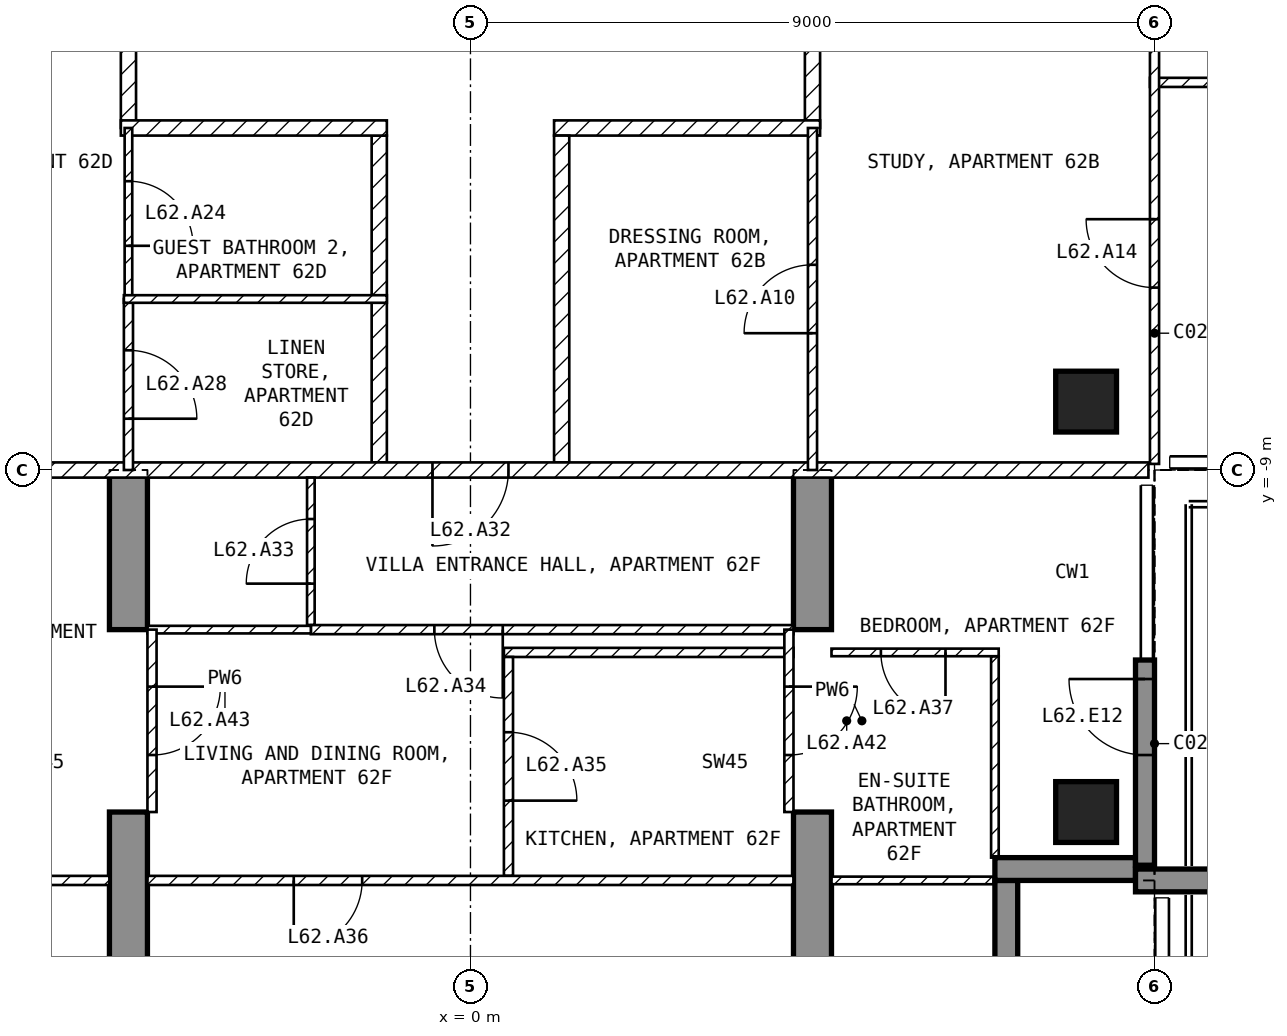
"""IFC4 building model, lengths in metres.
Left out: names, types, materials, properties, quantities, classifications, styles, units other than length and angle.
Written with IfcOpenShell. Run it as: python <this file> out.ifc"""

import sys

from ifc_helpers import new_model, si_unit, direction, frame, frame_2d, origin, origin_2d, place, context, subcontext, project, spatial, polyline, rectangle, outline, extrude, element, fill, save


model = new_model("IFC4")
c1 = context("Model", 3, precision=1e-05, world=origin(), true_north=direction((0.0, 1.0)))
c2 = subcontext(c1, "Body", "Model", "MODEL_VIEW")
j1 = project(units=[si_unit("LENGTHUNIT", "METRE"), si_unit("PLANEANGLEUNIT", "RADIAN")], contexts=[c1])
p1 = place(None, origin())
s1 = spatial("IfcSite", under=j1, at=p1, CompositionType="ELEMENT")
p2 = place(p1, origin())
s2 = spatial("IfcBuilding", under=s1, at=p2, CompositionType="ELEMENT")
p3 = place(p2, frame((0.0, 0.0, 246.5)))
s3 = spatial("IfcBuildingStorey", under=s2, at=p3, CompositionType="ELEMENT", Elevation=246.5)
for number, where, z_axis, x_axis in (
    (1, (8.1, -13.5, -0.25), (0.0, 0.0, 1.0), (1.0, 0.0, 0.0)),
    (2, (8.1, -8.1, -0.25), (0.0, 0.0, 1.0), (1.0, 0.0, 0.0)),
):
    element("IfcColumn", number, at=place(p3, frame(where, z_axis=z_axis, x_axis=x_axis)), inside=s3, PredefinedType="COLUMN", context=c2, shape_type="SweptSolid", body=[
        extrude(rectangle(XDim=0.8, YDim=0.8, at=origin_2d()), origin(), (0.0, 0.0, 1.0), 3.5),
    ])
for number, where, z_axis, x_axis in (
    (3, (-4.75, -16.7, -0.25), (1.0, 0.0, 0.0), (0.0, 1.0, 0.0)),
    (4, (4.25, -16.7, -0.25), (1.0, 0.0, 0.0), (0.0, 1.0, 0.0)),
):
    element("IfcWall", number, at=place(p3, frame(where, z_axis=z_axis, x_axis=x_axis)), inside=s3, PredefinedType="SHEAR", context=c2, shape_type="SweptSolid", body=[
        extrude(outline(polyline([(0.0, 0.0), (3.2, 0.0), (3.2, 2.65), (5.6, 2.65), (5.6, 0.0), (7.7, 0.0), (7.7, 3.5), (0.0, 3.5), (0.0, 0.0)])), origin(), (0.0, 0.0, 1.0), 0.5),
    ])
p4 = place(p3, frame((8.875, -14.2, 0.0), z_axis=(0.0, 0.0, 1.0), x_axis=(0.0, 1.0, 0.0)))
e5 = element("IfcWall", 5, at=p4, inside=s3, PredefinedType="SOLIDWALL", context=c2, shape_type="SweptSolid", body=[
    extrude(rectangle(XDim=2.7, YDim=0.25, at=frame_2d((1.35, 0.0))), origin(), (0.0, 0.0, 1.0), 3.25),
])
p5 = place(p4, frame((1.45, 0.0, 0.0)))
e6 = element("IfcOpeningElement", 6, at=p5, cuts=e5, PredefinedType="OPENING", context=c2, shape_type="SweptSolid", body=[
    extrude(rectangle(XDim=1.0, YDim=2.4, at=frame_2d((0.5, 1.2))), frame((0.0, 0.135, 0.0), z_axis=(0.0, -1.0, 0.0), x_axis=(1.0, 0.0, 0.0)), (0.0, 0.0, 1.0), 0.27),
])
p6 = place(p3, frame((7.05, -16.2, 0.0), z_axis=(0.0, 0.0, 1.0), x_axis=(0.0, 1.0, 0.0)))
e7 = element("IfcWall", 7, at=p6, inside=s3, PredefinedType="SOLIDWALL", context=c2, shape_type="SweptSolid", body=[
    extrude(rectangle(XDim=1.8, YDim=0.3, at=frame_2d((0.9, 0.0))), origin(), (0.0, 0.0, 1.0), 3.25),
])
p7 = place(p3, frame((6.9, -14.25, 0.0), z_axis=(0.0, 0.0, 1.0), x_axis=(1.0, 0.0, 0.0)))
e8 = element("IfcWall", 8, at=p7, inside=s3, PredefinedType="SOLIDWALL", context=c2, shape_type="SweptSolid", body=[
    extrude(rectangle(XDim=1.85, YDim=0.3, at=frame_2d((0.925, 0.0))), origin(), (0.0, 0.0, 1.0), 3.25),
])
p8 = place(p3, frame((8.75, -14.4, 0.0), z_axis=(0.0, 0.0, 1.0), x_axis=(1.0, 0.0, 0.0)))
e9 = element("IfcWall", 9, at=p8, inside=s3, PredefinedType="SOLIDWALL", context=c2, shape_type="SweptSolid", body=[
    extrude(rectangle(XDim=2.95, YDim=0.3, at=frame_2d((1.475, 0.0))), origin(), (0.0, 0.0, 1.0), 3.25),
])
p9 = place(p3, frame((4.5, -1.3, 0.0), z_axis=(0.0, 0.0, 1.0), x_axis=(0.0, -1.0, 0.0)))
e10 = element("IfcWall", 10, at=p9, inside=s3, PredefinedType="PARTITIONING", context=c2, shape_type="SweptSolid", body=[
    extrude(rectangle(XDim=3.2, YDim=0.2, at=frame_2d((1.6, 0.0))), origin(), (0.0, 0.0, 1.0), 3.25),
])
p10 = place(p3, frame((4.6, -4.5, 0.0), z_axis=(0.0, 0.0, 1.0), x_axis=(-1.0, 0.0, 0.0)))
e11 = element("IfcWall", 11, at=p10, inside=s3, PredefinedType="PARTITIONING", context=c2, shape_type="SweptSolid", body=[
    extrude(rectangle(XDim=3.5, YDim=0.2, at=frame_2d((1.75, 0.0))), origin(), (0.0, 0.0, 1.0), 3.25),
])
p11 = place(p3, frame((1.2, -4.6, 0.0), z_axis=(0.0, 0.0, 1.0), x_axis=(0.0, -1.0, 0.0)))
e12 = element("IfcWall", 12, at=p11, inside=s3, PredefinedType="PARTITIONING", context=c2, shape_type="SweptSolid", body=[
    extrude(rectangle(XDim=4.3, YDim=0.2, at=frame_2d((2.15, 0.0))), origin(), (0.0, 0.0, 1.0), 3.25),
])
p12 = place(p3, frame((-4.5, -4.5, 0.0), z_axis=(0.0, 0.0, 1.0), x_axis=(0.0, 1.0, 0.0)))
e13 = element("IfcWall", 13, at=p12, inside=s3, PredefinedType="PARTITIONING", context=c2, shape_type="SweptSolid", body=[
    extrude(rectangle(XDim=3.2, YDim=0.2, at=frame_2d((1.6, 0.0))), origin(), (0.0, 0.0, 1.0), 3.25),
])
p13 = place(p3, frame((-1.2, -8.9, 0.0), z_axis=(0.0, 0.0, 1.0), x_axis=(0.0, 1.0, 0.0)))
e14 = element("IfcWall", 14, at=p13, inside=s3, PredefinedType="PARTITIONING", context=c2, shape_type="SweptSolid", body=[
    extrude(rectangle(XDim=4.3, YDim=0.2, at=frame_2d((2.15, 0.0))), origin(), (0.0, 0.0, 1.0), 3.25),
])
p14 = place(p3, frame((-1.1, -4.5, 0.0), z_axis=(0.0, 0.0, 1.0), x_axis=(-1.0, 0.0, 0.0)))
e15 = element("IfcWall", 15, at=p14, inside=s3, PredefinedType="PARTITIONING", context=c2, shape_type="SweptSolid", body=[
    extrude(rectangle(XDim=3.5, YDim=0.2, at=frame_2d((1.75, 0.0))), origin(), (0.0, 0.0, 1.0), 3.25),
])
p15 = place(p3, frame((8.92, -9.0, 0.0), z_axis=(0.0, 0.0, 1.0), x_axis=(-1.0, 0.0, 0.0)))
e16 = element("IfcWall", 16, at=p15, inside=s3, PredefinedType="PARTITIONING", context=c2, shape_type="SweptSolid", body=[
    extrude(rectangle(XDim=17.84, YDim=0.2, at=frame_2d((8.92, 0.0))), origin(), (0.0, 0.0, 1.0), 3.25),
])
p16 = place(p15, frame((8.42, 0.0, 0.0)))
e17 = element("IfcOpeningElement", 17, at=p16, cuts=e16, PredefinedType="OPENING", context=c2, shape_type="SweptSolid", body=[
    extrude(rectangle(XDim=1.0, YDim=2.1, at=frame_2d((0.5, 1.05))), frame((0.0, 0.11, 0.0), z_axis=(0.0, -1.0, 0.0), x_axis=(1.0, 0.0, 0.0)), (0.0, 0.0, 1.0), 0.22),
])
p17 = place(p3, frame((16.8, -3.9, 0.0), z_axis=(0.0, 0.0, 1.0), x_axis=(-1.0, 0.0, 0.0)))
e18 = element("IfcWall", 18, at=p17, inside=s3, PredefinedType="PARTITIONING", context=c2, shape_type="SweptSolid", body=[
    extrude(rectangle(XDim=7.86, YDim=0.12, at=frame_2d((3.93, 0.0))), origin(), (0.0, 0.0, 1.0), 3.25),
])
p18 = place(p17, frame((3.15, 0.0, 0.0)))
e19 = element("IfcOpeningElement", 19, at=p18, cuts=e18, PredefinedType="OPENING", context=c2, shape_type="SweptSolid", body=[
    extrude(rectangle(XDim=0.9, YDim=2.1, at=frame_2d((0.45, 1.05))), frame((0.0, 0.07, 0.0), z_axis=(0.0, -1.0, 0.0), x_axis=(1.0, 0.0, 0.0)), (0.0, 0.0, 1.0), 0.14),
])
p19 = place(p3, frame((9.0, -8.92, 0.0), z_axis=(0.0, 0.0, 1.0), x_axis=(0.0, 1.0, 0.0)))
e20 = element("IfcWall", 20, at=p19, inside=s3, PredefinedType="PARTITIONING", context=c2, shape_type="SweptSolid", body=[
    extrude(rectangle(XDim=7.62, YDim=0.12, at=frame_2d((3.81, 0.0))), origin(), (0.0, 0.0, 1.0), 3.25),
])
p20 = place(p19, frame((2.32, 0.0, 0.0)))
e21 = element("IfcOpeningElement", 21, at=p20, cuts=e20, PredefinedType="OPENING", context=c2, shape_type="SweptSolid", body=[
    extrude(rectangle(XDim=0.9, YDim=2.1, at=frame_2d((0.45, 1.05))), frame((0.0, 0.07, 0.0), z_axis=(0.0, -1.0, 0.0), x_axis=(1.0, 0.0, 0.0)), (0.0, 0.0, 1.0), 0.14),
])
p21 = place(p3, frame((4.5, -9.0, 0.0), z_axis=(0.0, 0.0, 1.0), x_axis=(0.0, 1.0, 0.0)))
e22 = element("IfcWall", 22, at=p21, inside=s3, PredefinedType="PARTITIONING", context=c2, shape_type="SweptSolid", body=[
    extrude(rectangle(XDim=4.5, YDim=0.12, at=frame_2d((2.25, 0.0))), origin(), (0.0, 0.0, 1.0), 3.25),
])
p22 = place(p21, frame((1.8, 0.0, 0.0)))
e23 = element("IfcOpeningElement", 23, at=p22, cuts=e22, PredefinedType="OPENING", context=c2, shape_type="SweptSolid", body=[
    extrude(rectangle(XDim=0.9, YDim=2.1, at=frame_2d((0.45, 1.05))), frame((0.0, 0.07, 0.0), z_axis=(0.0, -1.0, 0.0), x_axis=(1.0, 0.0, 0.0)), (0.0, 0.0, 1.0), 0.14),
])
p23 = place(p3, frame((-4.5, -4.5, 0.0), z_axis=(0.0, 0.0, 1.0), x_axis=(0.0, -1.0, 0.0)))
e24 = element("IfcWall", 24, at=p23, inside=s3, PredefinedType="PARTITIONING", context=c2, shape_type="SweptSolid", body=[
    extrude(rectangle(XDim=2.25, YDim=0.1, at=frame_2d((1.125, 0.0))), origin(), (0.0, 0.0, 1.0), 3.25),
])
p24 = place(p23, frame((0.7, 0.0, 0.0)))
e25 = element("IfcOpeningElement", 25, at=p24, cuts=e24, PredefinedType="OPENING", context=c2, shape_type="SweptSolid", body=[
    extrude(rectangle(XDim=0.85, YDim=2.1, at=frame_2d((0.425, 1.05))), frame((0.0, 0.06, 0.0), z_axis=(0.0, -1.0, 0.0), x_axis=(1.0, 0.0, 0.0)), (0.0, 0.0, 1.0), 0.12),
])
p25 = place(p3, frame((-4.5, -6.75, 0.0), z_axis=(0.0, 0.0, 1.0), x_axis=(0.0, -1.0, 0.0)))
e26 = element("IfcWall", 26, at=p25, inside=s3, PredefinedType="PARTITIONING", context=c2, shape_type="SweptSolid", body=[
    extrude(rectangle(XDim=2.25, YDim=0.12, at=frame_2d((1.125, 0.0))), origin(), (0.0, 0.0, 1.0), 3.25),
])
p26 = place(p25, frame((0.675, 0.0, 0.0)))
e27 = element("IfcOpeningElement", 27, at=p26, cuts=e26, PredefinedType="OPENING", context=c2, shape_type="SweptSolid", body=[
    extrude(rectangle(XDim=0.9, YDim=2.1, at=frame_2d((0.45, 1.05))), frame((0.0, 0.07, 0.0), z_axis=(0.0, -1.0, 0.0), x_axis=(1.0, 0.0, 0.0)), (0.0, 0.0, 1.0), 0.14),
])
p27 = place(p3, frame((-1.1, -6.75, 0.0), z_axis=(0.0, 0.0, 1.0), x_axis=(-1.0, 0.0, 0.0)))
e28 = element("IfcWall", 28, at=p27, inside=s3, PredefinedType="PARTITIONING", context=c2, shape_type="SweptSolid", body=[
    extrude(rectangle(XDim=3.46, YDim=0.1, at=frame_2d((1.73, 0.0))), origin(), (0.0, 0.0, 1.0), 3.25),
])
p28 = place(p3, frame((-2.1, -11.04, 0.0), z_axis=(0.0, 0.0, 1.0), x_axis=(0.0, 1.0, 0.0)))
e29 = element("IfcWall", 29, at=p28, inside=s3, PredefinedType="PARTITIONING", context=c2, shape_type="SweptSolid", body=[
    extrude(rectangle(XDim=1.94, YDim=0.1, at=frame_2d((0.97, 0.0))), origin(), (0.0, 0.0, 1.0), 3.25),
])
p29 = place(p28, frame((0.545, 0.0, 0.0)))
e30 = element("IfcOpeningElement", 30, at=p29, cuts=e29, PredefinedType="OPENING", context=c2, shape_type="SweptSolid", body=[
    extrude(rectangle(XDim=0.85, YDim=2.1, at=frame_2d((0.425, 1.05))), frame((0.0, 0.06, 0.0), z_axis=(0.0, -1.0, 0.0), x_axis=(1.0, 0.0, 0.0)), (0.0, 0.0, 1.0), 0.12),
])
p30 = place(p3, frame((4.25, -11.1, 0.0), z_axis=(0.0, 0.0, 1.0), x_axis=(-1.0, 0.0, 0.0)))
e31 = element("IfcWall", 31, at=p30, inside=s3, PredefinedType="PARTITIONING", context=c2, shape_type="SweptSolid", body=[
    extrude(rectangle(XDim=6.35, YDim=0.12, at=frame_2d((3.175, 0.0))), origin(), (0.0, 0.0, 1.0), 3.25),
])
p31 = place(p30, frame((3.825, 0.0, 0.0)))
e32 = element("IfcOpeningElement", 32, at=p31, cuts=e31, PredefinedType="OPENING", context=c2, shape_type="SweptSolid", body=[
    extrude(rectangle(XDim=0.9, YDim=2.1, at=frame_2d((0.45, 1.05))), frame((0.0, 0.07, 0.0), z_axis=(0.0, -1.0, 0.0), x_axis=(1.0, 0.0, 0.0)), (0.0, 0.0, 1.0), 0.14),
])
p32 = place(p3, frame((-2.1, -11.1, 0.0), z_axis=(0.0, 0.0, 1.0), x_axis=(-1.0, 0.0, 0.0)))
e33 = element("IfcWall", 33, at=p32, inside=s3, PredefinedType="PARTITIONING", context=c2, shape_type="SweptSolid", body=[
    extrude(rectangle(XDim=2.15, YDim=0.1, at=frame_2d((1.075, 0.0))), origin(), (0.0, 0.0, 1.0), 3.25),
])
p33 = place(p3, frame((4.25, -11.4, 0.0), z_axis=(0.0, 0.0, 1.0), x_axis=(-1.0, 0.0, 0.0)))
e34 = element("IfcWall", 34, at=p33, inside=s3, PredefinedType="PARTITIONING", context=c2, shape_type="SweptSolid", body=[
    extrude(rectangle(XDim=3.81, YDim=0.12, at=frame_2d((1.905, 0.0))), origin(), (0.0, 0.0, 1.0), 3.25),
])
p34 = place(p3, frame((0.5, -11.46, 0.0), z_axis=(0.0, 0.0, 1.0), x_axis=(0.0, -1.0, 0.0)))
e35 = element("IfcWall", 35, at=p34, inside=s3, PredefinedType="PARTITIONING", context=c2, shape_type="SweptSolid", body=[
    extrude(rectangle(XDim=2.88, YDim=0.12, at=frame_2d((1.44, 0.0))), origin(), (0.0, 0.0, 1.0), 3.25),
])
p35 = place(p34, frame((0.99, 0.0, 0.0)))
e36 = element("IfcOpeningElement", 36, at=p35, cuts=e35, PredefinedType="OPENING", context=c2, shape_type="SweptSolid", body=[
    extrude(rectangle(XDim=0.9, YDim=2.1, at=frame_2d((0.45, 1.05))), frame((0.0, 0.07, 0.0), z_axis=(0.0, -1.0, 0.0), x_axis=(1.0, 0.0, 0.0)), (0.0, 0.0, 1.0), 0.14),
])
p36 = place(p3, frame((4.25, -14.4, 0.0), z_axis=(0.0, 0.0, 1.0), x_axis=(-1.0, 0.0, 0.0)))
e37 = element("IfcWall", 37, at=p36, inside=s3, PredefinedType="PARTITIONING", context=c2, shape_type="SweptSolid", body=[
    extrude(rectangle(XDim=8.5, YDim=0.12, at=frame_2d((4.25, 0.0))), origin(), (0.0, 0.0, 1.0), 3.25),
])
p37 = place(p36, frame((5.675, 0.0, 0.0)))
e38 = element("IfcOpeningElement", 38, at=p37, cuts=e37, PredefinedType="OPENING", context=c2, shape_type="SweptSolid", body=[
    extrude(rectangle(XDim=0.9, YDim=2.1, at=frame_2d((0.45, 1.05))), frame((0.0, 0.07, 0.0), z_axis=(0.0, -1.0, 0.0), x_axis=(1.0, 0.0, 0.0)), (0.0, 0.0, 1.0), 0.14),
])
p38 = place(p3, frame((6.9, -14.1, 0.0), z_axis=(0.0, 0.0, 1.0), x_axis=(0.0, 1.0, 0.0)))
e39 = element("IfcWall", 39, at=p38, inside=s3, PredefinedType="PARTITIONING", context=c2, shape_type="SweptSolid", body=[
    extrude(rectangle(XDim=2.65, YDim=0.1, at=frame_2d((1.325, 0.0))), origin(), (0.0, 0.0, 1.0), 3.25),
])
p39 = place(p3, frame((6.95, -11.4, 0.0), z_axis=(0.0, 0.0, 1.0), x_axis=(-1.0, 0.0, 0.0)))
e40 = element("IfcWall", 40, at=p39, inside=s3, PredefinedType="PARTITIONING", context=c2, shape_type="SweptSolid", body=[
    extrude(rectangle(XDim=2.2, YDim=0.1, at=frame_2d((1.1, 0.0))), origin(), (0.0, 0.0, 1.0), 3.25),
])
p40 = place(p39, frame((0.7, 0.0, 0.0)))
e41 = element("IfcOpeningElement", 41, at=p40, cuts=e40, PredefinedType="OPENING", context=c2, shape_type="SweptSolid", body=[
    extrude(rectangle(XDim=0.85, YDim=2.1, at=frame_2d((0.425, 1.05))), frame((0.0, 0.06, 0.0), z_axis=(0.0, -1.0, 0.0), x_axis=(1.0, 0.0, 0.0)), (0.0, 0.0, 1.0), 0.12),
])
p41 = place(p3, frame((7.12, -14.4, 0.0), z_axis=(0.0, 0.0, 1.0), x_axis=(-1.0, 0.0, 0.0)))
e42 = element("IfcWall", 42, at=p41, inside=s3, PredefinedType="PARTITIONING", context=c2, shape_type="SweptSolid", body=[
    extrude(rectangle(XDim=2.37, YDim=0.1, at=frame_2d((1.185, 0.0))), origin(), (0.0, 0.0, 1.0), 3.25),
])
p42 = place(p3, frame((-4.75, -14.4, 0.0), z_axis=(0.0, 0.0, 1.0), x_axis=(-1.0, 0.0, 0.0)))
e43 = element("IfcWall", 43, at=p42, inside=s3, PredefinedType="PARTITIONING", context=c2, shape_type="SweptSolid", body=[
    extrude(rectangle(XDim=2.37, YDim=0.12, at=frame_2d((1.185, 0.0))), origin(), (0.0, 0.0, 1.0), 3.25),
])
p43 = place(p3, frame((4.19, -11.1, 0.0), z_axis=(0.0, 0.0, 1.0), x_axis=(0.0, -1.0, 0.0)))
e44 = element("IfcWall", 44, at=p43, inside=s3, PredefinedType="PARTITIONING", context=c2, shape_type="SweptSolid", body=[
    extrude(rectangle(XDim=2.4, YDim=0.12, at=frame_2d((1.2, 0.0))), origin(), (0.0, 0.0, 1.0), 2.4),
])
p44 = place(p43, frame((0.75, 0.0, 0.0)))
e45 = element("IfcOpeningElement", 45, at=p44, cuts=e44, PredefinedType="OPENING", context=c2, shape_type="SweptSolid", body=[
    extrude(rectangle(XDim=0.9, YDim=2.1, at=frame_2d((0.45, 1.05))), frame((0.0, 0.07, 0.0), z_axis=(0.0, -1.0, 0.0), x_axis=(1.0, 0.0, 0.0)), (0.0, 0.0, 1.0), 0.14),
])
p45 = place(p3, frame((-4.19, -11.1, 0.0), z_axis=(0.0, 0.0, 1.0), x_axis=(0.0, -1.0, 0.0)))
e46 = element("IfcWall", 46, at=p45, inside=s3, PredefinedType="PARTITIONING", context=c2, shape_type="SweptSolid", body=[
    extrude(rectangle(XDim=2.4, YDim=0.12, at=frame_2d((1.2, 0.0))), origin(), (0.0, 0.0, 1.0), 2.4),
])
p46 = place(p45, frame((0.75, 0.0, 0.0)))
e47 = element("IfcOpeningElement", 47, at=p46, cuts=e46, PredefinedType="OPENING", context=c2, shape_type="SweptSolid", body=[
    extrude(rectangle(XDim=0.9, YDim=2.1, at=frame_2d((0.45, 1.05))), frame((0.0, 0.07, 0.0), z_axis=(0.0, -1.0, 0.0), x_axis=(1.0, 0.0, 0.0)), (0.0, 0.0, 1.0), 0.14),
])
p47 = place(p5, origin())
e48 = element("IfcDoor", 48, at=p47, inside=s3, OperationType="SINGLE_SWING_RIGHT", PredefinedType="DOOR", context=c2, shape_type="SweptSolid", body=[
    extrude(rectangle(XDim=1.0, YDim=2.4, at=frame_2d((0.5, 1.2))), frame((0.0, 0.025, 0.0), z_axis=(0.0, -1.0, 0.0), x_axis=(1.0, 0.0, 0.0)), (0.0, 0.0, 1.0), 0.05),
])
fill(e6, e48)
p48 = place(p22, origin())
e49 = element("IfcDoor", 49, at=p48, inside=s3, OperationType="SINGLE_SWING_LEFT", PredefinedType="DOOR", context=c2, shape_type="SweptSolid", body=[
    extrude(rectangle(XDim=0.9, YDim=2.1, at=frame_2d((0.45, 1.05))), frame((0.0, 0.025, 0.0), z_axis=(0.0, -1.0, 0.0), x_axis=(1.0, 0.0, 0.0)), (0.0, 0.0, 1.0), 0.05),
])
fill(e23, e49)
p49 = place(p20, origin())
e50 = element("IfcDoor", 50, at=p49, inside=s3, OperationType="SINGLE_SWING_RIGHT", PredefinedType="DOOR", context=c2, shape_type="SweptSolid", body=[
    extrude(rectangle(XDim=0.9, YDim=2.1, at=frame_2d((0.45, 1.05))), frame((0.0, 0.025, 0.0), z_axis=(0.0, -1.0, 0.0), x_axis=(1.0, 0.0, 0.0)), (0.0, 0.0, 1.0), 0.05),
])
fill(e21, e50)
p50 = place(p24, origin())
e51 = element("IfcDoor", 51, at=p50, inside=s3, OperationType="SINGLE_SWING_RIGHT", PredefinedType="DOOR", context=c2, shape_type="SweptSolid", body=[
    extrude(rectangle(XDim=0.85, YDim=2.1, at=frame_2d((0.425, 1.05))), frame((0.0, 0.025, 0.0), z_axis=(0.0, -1.0, 0.0), x_axis=(1.0, 0.0, 0.0)), (0.0, 0.0, 1.0), 0.05),
])
fill(e25, e51)
p51 = place(p26, origin())
e52 = element("IfcDoor", 52, at=p51, inside=s3, OperationType="SINGLE_SWING_RIGHT", PredefinedType="DOOR", context=c2, shape_type="SweptSolid", body=[
    extrude(rectangle(XDim=0.9, YDim=2.1, at=frame_2d((0.45, 1.05))), frame((0.0, 0.025, 0.0), z_axis=(0.0, -1.0, 0.0), x_axis=(1.0, 0.0, 0.0)), (0.0, 0.0, 1.0), 0.05),
])
fill(e27, e52)
p52 = place(p16, origin())
e53 = element("IfcDoor", 53, at=p52, inside=s3, OperationType="SINGLE_SWING_RIGHT", PredefinedType="DOOR", context=c2, shape_type="SweptSolid", body=[
    extrude(rectangle(XDim=1.0, YDim=2.1, at=frame_2d((0.5, 1.05))), frame((0.0, 0.025, 0.0), z_axis=(0.0, -1.0, 0.0), x_axis=(1.0, 0.0, 0.0)), (0.0, 0.0, 1.0), 0.05),
])
fill(e17, e53)
p53 = place(p29, origin())
e54 = element("IfcDoor", 54, at=p53, inside=s3, OperationType="SINGLE_SWING_LEFT", PredefinedType="DOOR", context=c2, shape_type="SweptSolid", body=[
    extrude(rectangle(XDim=0.85, YDim=2.1, at=frame_2d((0.425, 1.05))), frame((0.0, 0.025, 0.0), z_axis=(0.0, -1.0, 0.0), x_axis=(1.0, 0.0, 0.0)), (0.0, 0.0, 1.0), 0.05),
])
fill(e30, e54)
p54 = place(p31, origin())
e55 = element("IfcDoor", 55, at=p54, inside=s3, OperationType="SINGLE_SWING_LEFT", PredefinedType="DOOR", context=c2, shape_type="SweptSolid", body=[
    extrude(rectangle(XDim=0.9, YDim=2.1, at=frame_2d((0.45, 1.05))), frame((0.0, 0.025, 0.0), z_axis=(0.0, -1.0, 0.0), x_axis=(1.0, 0.0, 0.0)), (0.0, 0.0, 1.0), 0.05),
])
fill(e32, e55)
p55 = place(p35, origin())
e56 = element("IfcDoor", 56, at=p55, inside=s3, OperationType="SINGLE_SWING_RIGHT", PredefinedType="DOOR", context=c2, shape_type="SweptSolid", body=[
    extrude(rectangle(XDim=0.9, YDim=2.1, at=frame_2d((0.45, 1.05))), frame((0.0, 0.025, 0.0), z_axis=(0.0, -1.0, 0.0), x_axis=(1.0, 0.0, 0.0)), (0.0, 0.0, 1.0), 0.05),
])
fill(e36, e56)
p56 = place(p37, origin())
e57 = element("IfcDoor", 57, at=p56, inside=s3, OperationType="SINGLE_SWING_RIGHT", PredefinedType="DOOR", context=c2, shape_type="SweptSolid", body=[
    extrude(rectangle(XDim=0.9, YDim=2.1, at=frame_2d((0.45, 1.05))), frame((0.0, 0.025, 0.0), z_axis=(0.0, -1.0, 0.0), x_axis=(1.0, 0.0, 0.0)), (0.0, 0.0, 1.0), 0.05),
])
fill(e38, e57)
p57 = place(p40, origin())
e58 = element("IfcDoor", 58, at=p57, inside=s3, OperationType="SINGLE_SWING_LEFT", PredefinedType="DOOR", context=c2, shape_type="SweptSolid", body=[
    extrude(rectangle(XDim=0.85, YDim=2.1, at=frame_2d((0.425, 1.05))), frame((0.0, 0.025, 0.0), z_axis=(0.0, -1.0, 0.0), x_axis=(1.0, 0.0, 0.0)), (0.0, 0.0, 1.0), 0.05),
])
fill(e41, e58)
p58 = place(p44, origin())
e59 = element("IfcDoor", 59, at=p58, inside=s3, OperationType="SINGLE_SWING_LEFT", PredefinedType="DOOR", context=c2, shape_type="SweptSolid", body=[
    extrude(rectangle(XDim=0.9, YDim=2.1, at=frame_2d((0.45, 1.05))), frame((0.0, 0.025, 0.0), z_axis=(0.0, -1.0, 0.0), x_axis=(1.0, 0.0, 0.0)), (0.0, 0.0, 1.0), 0.05),
])
fill(e45, e59)
p59 = place(p46, origin())
e60 = element("IfcDoor", 60, at=p59, inside=s3, OperationType="SINGLE_SWING_LEFT", PredefinedType="DOOR", context=c2, shape_type="SweptSolid", body=[
    extrude(rectangle(XDim=0.9, YDim=2.1, at=frame_2d((0.45, 1.05))), frame((0.0, 0.025, 0.0), z_axis=(0.0, -1.0, 0.0), x_axis=(1.0, 0.0, 0.0)), (0.0, 0.0, 1.0), 0.05),
])
fill(e47, e60)
save(model, sys.argv[1])
